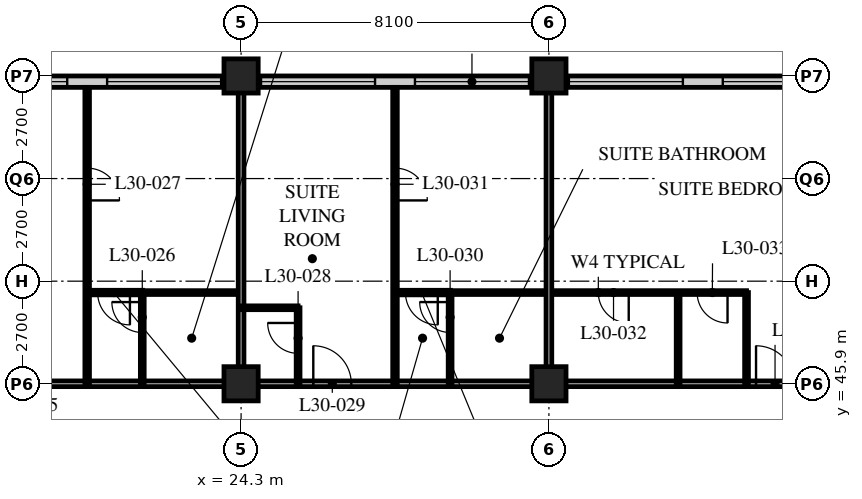
"""IFC4 building model, lengths in metres.
Left out: names, types, materials, properties, quantities, classifications, styles, units other than length and angle.
Written with IfcOpenShell. Run it as: python <this file> out.ifc"""

import sys

from ifc_helpers import new_model, si_unit, direction, frame, frame_2d, origin, origin_2d, place, context, subcontext, project, spatial, rectangle, hollow_rectangle, extrude, element, fill, save


model = new_model("IFC4")
c1 = context("Model", 3, precision=1e-05, world=origin(), true_north=direction((0.0, 1.0)))
c2 = subcontext(c1, "Body", "Model", "MODEL_VIEW")
j1 = project(units=[si_unit("LENGTHUNIT", "METRE"), si_unit("PLANEANGLEUNIT", "RADIAN")], contexts=[c1])
p1 = place(None, origin())
s1 = spatial("IfcSite", under=j1, at=p1, CompositionType="ELEMENT")
p2 = place(p1, origin())
s2 = spatial("IfcBuilding", under=s1, at=p2, CompositionType="ELEMENT")
p3 = place(p2, frame((0.0, 0.0, 120.4)))
s3 = spatial("IfcBuildingStorey", under=s2, at=p3, CompositionType="ELEMENT", Elevation=120.4)
for number, where, z_axis, x_axis in (
    (1, (24.3, 45.9, 0.0), (0.0, 0.0, 1.0), (1.0, 0.0, 0.0)),
    (2, (24.3, 54.0, 0.0), (0.0, 0.0, 1.0), (1.0, 0.0, 0.0)),
    (3, (32.4, 45.9, 0.0), (0.0, 0.0, 1.0), (1.0, 0.0, 0.0)),
    (4, (32.4, 54.0, 0.0), (0.0, 0.0, 1.0), (1.0, 0.0, 0.0)),
):
    element("IfcColumn", number, at=place(p3, frame(where, z_axis=z_axis, x_axis=x_axis)), inside=s3, PredefinedType="COLUMN", context=c2, shape_type="SweptSolid", body=[
        extrude(hollow_rectangle(XDim=0.9, YDim=0.9, WallThickness=0.09, at=origin_2d()), origin(), (0.0, 0.0, 1.0), 3.4),
    ])
p4 = place(p3, frame((48.3, 53.85, 0.0), z_axis=(0.0, 0.0, 1.0), x_axis=(-1.0, 0.0, 0.0)))
e5 = element("IfcWall", 5, at=p4, inside=s3, PredefinedType="SOLIDWALL", context=c2, shape_type="SweptSolid", body=[
    extrude(rectangle(XDim=40.2, YDim=0.3, at=frame_2d((20.1, 0.0))), origin(), (0.0, 0.0, 1.0), 3.19),
])
p5 = place(p4, frame((0.225, 0.0, 0.9)))
e6 = element("IfcOpeningElement", 6, at=p5, cuts=e5, PredefinedType="OPENING", context=c2, shape_type="SweptSolid", body=[
    extrude(rectangle(XDim=3.0, YDim=2.0, at=frame_2d((1.5, 1.0))), frame((0.0, 0.16, 0.0), z_axis=(0.0, -1.0, 0.0), x_axis=(1.0, 0.0, 0.0)), (0.0, 0.0, 1.0), 0.32),
])
p6 = place(p4, frame((4.275, 0.0, 0.9)))
e7 = element("IfcOpeningElement", 7, at=p6, cuts=e5, PredefinedType="OPENING", context=c2, shape_type="SweptSolid", body=[
    extrude(rectangle(XDim=3.0, YDim=2.0, at=frame_2d((1.5, 1.0))), frame((0.0, 0.16, 0.0), z_axis=(0.0, -1.0, 0.0), x_axis=(1.0, 0.0, 0.0)), (0.0, 0.0, 1.0), 0.32),
])
p7 = place(p4, frame((8.325, 0.0, 0.9)))
e8 = element("IfcOpeningElement", 8, at=p7, cuts=e5, PredefinedType="OPENING", context=c2, shape_type="SweptSolid", body=[
    extrude(rectangle(XDim=3.0, YDim=2.0, at=frame_2d((1.5, 1.0))), frame((0.0, 0.16, 0.0), z_axis=(0.0, -1.0, 0.0), x_axis=(1.0, 0.0, 0.0)), (0.0, 0.0, 1.0), 0.32),
])
p8 = place(p4, frame((12.375, 0.0, 0.9)))
e9 = element("IfcOpeningElement", 9, at=p8, cuts=e5, PredefinedType="OPENING", context=c2, shape_type="SweptSolid", body=[
    extrude(rectangle(XDim=3.0, YDim=2.0, at=frame_2d((1.5, 1.0))), frame((0.0, 0.16, 0.0), z_axis=(0.0, -1.0, 0.0), x_axis=(1.0, 0.0, 0.0)), (0.0, 0.0, 1.0), 0.32),
])
p9 = place(p4, frame((16.425, 0.0, 0.9)))
e10 = element("IfcOpeningElement", 10, at=p9, cuts=e5, PredefinedType="OPENING", context=c2, shape_type="SweptSolid", body=[
    extrude(rectangle(XDim=3.0, YDim=2.0, at=frame_2d((1.5, 1.0))), frame((0.0, 0.16, 0.0), z_axis=(0.0, -1.0, 0.0), x_axis=(1.0, 0.0, 0.0)), (0.0, 0.0, 1.0), 0.32),
])
p10 = place(p4, frame((20.475, 0.0, 0.9)))
e11 = element("IfcOpeningElement", 11, at=p10, cuts=e5, PredefinedType="OPENING", context=c2, shape_type="SweptSolid", body=[
    extrude(rectangle(XDim=3.0, YDim=2.0, at=frame_2d((1.5, 1.0))), frame((0.0, 0.16, 0.0), z_axis=(0.0, -1.0, 0.0), x_axis=(1.0, 0.0, 0.0)), (0.0, 0.0, 1.0), 0.32),
])
p11 = place(p4, frame((24.525, 0.0, 0.9)))
e12 = element("IfcOpeningElement", 12, at=p11, cuts=e5, PredefinedType="OPENING", context=c2, shape_type="SweptSolid", body=[
    extrude(rectangle(XDim=3.0, YDim=2.0, at=frame_2d((1.5, 1.0))), frame((0.0, 0.16, 0.0), z_axis=(0.0, -1.0, 0.0), x_axis=(1.0, 0.0, 0.0)), (0.0, 0.0, 1.0), 0.32),
])
p12 = place(p4, frame((28.575, 0.0, 0.9)))
e13 = element("IfcOpeningElement", 13, at=p12, cuts=e5, PredefinedType="OPENING", context=c2, shape_type="SweptSolid", body=[
    extrude(rectangle(XDim=3.0, YDim=2.0, at=frame_2d((1.5, 1.0))), frame((0.0, 0.16, 0.0), z_axis=(0.0, -1.0, 0.0), x_axis=(1.0, 0.0, 0.0)), (0.0, 0.0, 1.0), 0.32),
])
p13 = place(p4, frame((32.625, 0.0, 0.9)))
e14 = element("IfcOpeningElement", 14, at=p13, cuts=e5, PredefinedType="OPENING", context=c2, shape_type="SweptSolid", body=[
    extrude(rectangle(XDim=3.0, YDim=2.0, at=frame_2d((1.5, 1.0))), frame((0.0, 0.16, 0.0), z_axis=(0.0, -1.0, 0.0), x_axis=(1.0, 0.0, 0.0)), (0.0, 0.0, 1.0), 0.32),
])
p14 = place(p4, frame((36.675, 0.0, 0.9)))
e15 = element("IfcOpeningElement", 15, at=p14, cuts=e5, PredefinedType="OPENING", context=c2, shape_type="SweptSolid", body=[
    extrude(rectangle(XDim=3.0, YDim=2.0, at=frame_2d((1.5, 1.0))), frame((0.0, 0.16, 0.0), z_axis=(0.0, -1.0, 0.0), x_axis=(1.0, 0.0, 0.0)), (0.0, 0.0, 1.0), 0.32),
])
p15 = place(p3, frame((12.15, 45.9, 0.0), z_axis=(0.0, 0.0, 1.0), x_axis=(1.0, 0.0, 0.0)))
e16 = element("IfcWall", 16, at=p15, inside=s3, PredefinedType="PARTITIONING", context=c2, shape_type="SweptSolid", body=[
    extrude(rectangle(XDim=32.4, YDim=0.15, at=frame_2d((16.2, 0.0))), origin(), (0.0, 0.0, 1.0), 2.578),
])
p16 = place(p15, frame((5.95, 0.0, 0.0)))
e17 = element("IfcOpeningElement", 17, at=p16, cuts=e16, PredefinedType="OPENING", context=c2, shape_type="SweptSolid", body=[
    extrude(rectangle(XDim=1.0, YDim=2.1, at=frame_2d((0.5, 1.05))), frame((0.0, 0.085, 0.0), z_axis=(0.0, -1.0, 0.0), x_axis=(1.0, 0.0, 0.0)), (0.0, 0.0, 1.0), 0.17),
])
p17 = place(p15, frame((14.05, 0.0, 0.0)))
e18 = element("IfcOpeningElement", 18, at=p17, cuts=e16, PredefinedType="OPENING", context=c2, shape_type="SweptSolid", body=[
    extrude(rectangle(XDim=1.0, YDim=2.1, at=frame_2d((0.5, 1.05))), frame((0.0, 0.085, 0.0), z_axis=(0.0, -1.0, 0.0), x_axis=(1.0, 0.0, 0.0)), (0.0, 0.0, 1.0), 0.17),
])
p18 = place(p15, frame((25.7, 0.0, 0.0)))
e19 = element("IfcOpeningElement", 19, at=p18, cuts=e16, PredefinedType="OPENING", context=c2, shape_type="SweptSolid", body=[
    extrude(rectangle(XDim=1.0, YDim=2.1, at=frame_2d((0.5, 1.05))), frame((0.0, 0.085, 0.0), z_axis=(0.0, -1.0, 0.0), x_axis=(1.0, 0.0, 0.0)), (0.0, 0.0, 1.0), 0.17),
])
p19 = place(p15, frame((29.875, 0.0, 0.0)))
e20 = element("IfcOpeningElement", 20, at=p19, cuts=e16, PredefinedType="OPENING", context=c2, shape_type="SweptSolid", body=[
    extrude(rectangle(XDim=1.0, YDim=2.1, at=frame_2d((0.5, 1.05))), frame((0.0, 0.085, 0.0), z_axis=(0.0, -1.0, 0.0), x_axis=(1.0, 0.0, 0.0)), (0.0, 0.0, 1.0), 0.17),
])
p20 = place(p15, frame((1.525, 0.0, 0.0)))
e21 = element("IfcOpeningElement", 21, at=p20, cuts=e16, PredefinedType="OPENING", context=c2, shape_type="SweptSolid", body=[
    extrude(rectangle(XDim=1.0, YDim=2.1, at=frame_2d((0.5, 1.05))), frame((0.0, 0.085, 0.0), z_axis=(0.0, -1.0, 0.0), x_axis=(1.0, 0.0, 0.0)), (0.0, 0.0, 1.0), 0.17),
])
p21 = place(p3, frame((21.7, 48.3, 0.0), z_axis=(0.0, 0.0, 1.0), x_axis=(1.0, 0.0, 0.0)))
e22 = element("IfcWall", 22, at=p21, inside=s3, PredefinedType="PARTITIONING", context=c2, shape_type="SweptSolid", body=[
    extrude(rectangle(XDim=2.6, YDim=0.1, at=frame_2d((1.3, 0.0))), origin(), (0.0, 0.0, 1.0), 3.19),
])
p22 = place(p3, frame((21.7, 45.9, 0.0), z_axis=(0.0, 0.0, 1.0), x_axis=(0.0, 1.0, 0.0)))
e23 = element("IfcWall", 23, at=p22, inside=s3, PredefinedType="PARTITIONING", context=c2, shape_type="SweptSolid", body=[
    extrude(rectangle(XDim=2.4, YDim=0.1, at=frame_2d((1.2, 0.0))), origin(), (0.0, 0.0, 1.0), 3.19),
])
p23 = place(p22, frame((1.35, 0.0, 0.0)))
e24 = element("IfcOpeningElement", 24, at=p23, cuts=e23, PredefinedType="OPENING", context=c2, shape_type="SweptSolid", body=[
    extrude(rectangle(XDim=0.8, YDim=2.1, at=frame_2d((0.4, 1.05))), frame((0.0, 0.06, 0.0), z_axis=(0.0, -1.0, 0.0), x_axis=(1.0, 0.0, 0.0)), (0.0, 0.0, 1.0), 0.12),
])
p24 = place(p3, frame((20.25, 45.9, 0.0), z_axis=(0.0, 0.0, 1.0), x_axis=(0.0, 1.0, 0.0)))
e25 = element("IfcWall", 25, at=p24, inside=s3, PredefinedType="PARTITIONING", context=c2, shape_type="SweptSolid", body=[
    extrude(rectangle(XDim=7.8, YDim=0.12, at=frame_2d((3.9, 0.0))), origin(), (0.0, 0.0, 1.0), 3.19),
])
p25 = place(p24, frame((4.825, 0.0, 0.0)))
e26 = element("IfcOpeningElement", 26, at=p25, cuts=e25, PredefinedType="OPENING", context=c2, shape_type="SweptSolid", body=[
    extrude(rectangle(XDim=0.85, YDim=2.1, at=frame_2d((0.425, 1.05))), frame((0.0, 0.07, 0.0), z_axis=(0.0, -1.0, 0.0), x_axis=(1.0, 0.0, 0.0)), (0.0, 0.0, 1.0), 0.14),
])
p26 = place(p3, frame((24.3, 45.9, 0.0), z_axis=(0.0, 0.0, 1.0), x_axis=(0.0, 1.0, 0.0)))
e27 = element("IfcWall", 27, at=p26, inside=s3, PredefinedType="PARTITIONING", context=c2, shape_type="SweptSolid", body=[
    extrude(rectangle(XDim=7.8, YDim=0.15, at=frame_2d((3.9, 0.0))), origin(), (0.0, 0.0, 1.0), 2.578),
])
p27 = place(p3, frame((24.3, 47.9, 0.0), z_axis=(0.0, 0.0, 1.0), x_axis=(1.0, 0.0, 0.0)))
e28 = element("IfcWall", 28, at=p27, inside=s3, PredefinedType="PARTITIONING", context=c2, shape_type="SweptSolid", body=[
    extrude(rectangle(XDim=1.5, YDim=0.1, at=frame_2d((0.75, 0.0))), origin(), (0.0, 0.0, 1.0), 3.19),
])
p28 = place(p3, frame((25.8, 45.9, 0.0), z_axis=(0.0, 0.0, 1.0), x_axis=(0.0, 1.0, 0.0)))
e29 = element("IfcWall", 29, at=p28, inside=s3, PredefinedType="PARTITIONING", context=c2, shape_type="SweptSolid", body=[
    extrude(rectangle(XDim=2.0, YDim=0.1, at=frame_2d((1.0, 0.0))), origin(), (0.0, 0.0, 1.0), 3.19),
])
p29 = place(p28, frame((0.8, 0.0, 0.0)))
e30 = element("IfcOpeningElement", 30, at=p29, cuts=e29, PredefinedType="OPENING", context=c2, shape_type="SweptSolid", body=[
    extrude(rectangle(XDim=0.8, YDim=2.1, at=frame_2d((0.4, 1.05))), frame((0.0, 0.06, 0.0), z_axis=(0.0, -1.0, 0.0), x_axis=(1.0, 0.0, 0.0)), (0.0, 0.0, 1.0), 0.12),
])
p30 = place(p3, frame((29.8, 48.3, 0.0), z_axis=(0.0, 0.0, 1.0), x_axis=(1.0, 0.0, 0.0)))
e31 = element("IfcWall", 31, at=p30, inside=s3, PredefinedType="PARTITIONING", context=c2, shape_type="SweptSolid", body=[
    extrude(rectangle(XDim=7.8, YDim=0.1, at=frame_2d((3.9, 0.0))), origin(), (0.0, 0.0, 1.0), 3.19),
])
p31 = place(p30, frame((3.9, 0.0, 0.0)))
e32 = element("IfcOpeningElement", 32, at=p31, cuts=e31, PredefinedType="OPENING", context=c2, shape_type="SweptSolid", body=[
    extrude(rectangle(XDim=0.8, YDim=2.1, at=frame_2d((0.4, 1.05))), frame((0.0, 0.06, 0.0), z_axis=(0.0, -1.0, 0.0), x_axis=(1.0, 0.0, 0.0)), (0.0, 0.0, 1.0), 0.12),
])
p32 = place(p30, frame((6.5, 0.0, 0.0)))
e33 = element("IfcOpeningElement", 33, at=p32, cuts=e31, PredefinedType="OPENING", context=c2, shape_type="SweptSolid", body=[
    extrude(rectangle(XDim=0.8, YDim=2.1, at=frame_2d((0.4, 1.05))), frame((0.0, 0.06, 0.0), z_axis=(0.0, -1.0, 0.0), x_axis=(1.0, 0.0, 0.0)), (0.0, 0.0, 1.0), 0.12),
])
p33 = place(p3, frame((29.8, 45.9, 0.0), z_axis=(0.0, 0.0, 1.0), x_axis=(0.0, 1.0, 0.0)))
e34 = element("IfcWall", 34, at=p33, inside=s3, PredefinedType="PARTITIONING", context=c2, shape_type="SweptSolid", body=[
    extrude(rectangle(XDim=2.4, YDim=0.1, at=frame_2d((1.2, 0.0))), origin(), (0.0, 0.0, 1.0), 3.19),
])
p34 = place(p33, frame((1.35, 0.0, 0.0)))
e35 = element("IfcOpeningElement", 35, at=p34, cuts=e34, PredefinedType="OPENING", context=c2, shape_type="SweptSolid", body=[
    extrude(rectangle(XDim=0.8, YDim=2.1, at=frame_2d((0.4, 1.05))), frame((0.0, 0.06, 0.0), z_axis=(0.0, -1.0, 0.0), x_axis=(1.0, 0.0, 0.0)), (0.0, 0.0, 1.0), 0.12),
])
p35 = place(p3, frame((28.35, 45.9, 0.0), z_axis=(0.0, 0.0, 1.0), x_axis=(0.0, 1.0, 0.0)))
e36 = element("IfcWall", 36, at=p35, inside=s3, PredefinedType="PARTITIONING", context=c2, shape_type="SweptSolid", body=[
    extrude(rectangle(XDim=7.8, YDim=0.12, at=frame_2d((3.9, 0.0))), origin(), (0.0, 0.0, 1.0), 3.19),
])
p36 = place(p35, frame((4.825, 0.0, 0.0)))
e37 = element("IfcOpeningElement", 37, at=p36, cuts=e36, PredefinedType="OPENING", context=c2, shape_type="SweptSolid", body=[
    extrude(rectangle(XDim=0.85, YDim=2.1, at=frame_2d((0.425, 1.05))), frame((0.0, 0.07, 0.0), z_axis=(0.0, -1.0, 0.0), x_axis=(1.0, 0.0, 0.0)), (0.0, 0.0, 1.0), 0.14),
])
p37 = place(p3, frame((32.4, 45.9, 0.0), z_axis=(0.0, 0.0, 1.0), x_axis=(0.0, 1.0, 0.0)))
e38 = element("IfcWall", 38, at=p37, inside=s3, PredefinedType="PARTITIONING", context=c2, shape_type="SweptSolid", body=[
    extrude(rectangle(XDim=7.8, YDim=0.15, at=frame_2d((3.9, 0.0))), origin(), (0.0, 0.0, 1.0), 2.578),
])
for number, where, z_axis, x_axis in (
    (39, (35.8, 45.9, 0.0), (0.0, 0.0, 1.0), (0.0, 1.0, 0.0)),
    (40, (37.6, 45.9, 0.0), (0.0, 0.0, 1.0), (0.0, 1.0, 0.0)),
):
    element("IfcWall", number, at=place(p3, frame(where, z_axis=z_axis, x_axis=x_axis)), inside=s3, PredefinedType="PARTITIONING", context=c2, shape_type="SweptSolid", body=[
        extrude(rectangle(XDim=2.4, YDim=0.1, at=frame_2d((1.2, 0.0))), origin(), (0.0, 0.0, 1.0), 3.19),
    ])
p38 = place(p3, frame((20.25, 48.3, 0.0), z_axis=(0.0, 0.0, 1.0), x_axis=(1.0, 0.0, 0.0)))
e41 = element("IfcWall", 41, at=p38, inside=s3, PredefinedType="PARTITIONING", context=c2, shape_type="SweptSolid", body=[
    extrude(rectangle(XDim=1.46, YDim=0.12, at=frame_2d((0.73, 0.0))), origin(), (0.0, 0.0, 1.0), 3.19),
])
p39 = place(p38, frame((0.275, 0.0, 0.0)))
e42 = element("IfcOpeningElement", 42, at=p39, cuts=e41, PredefinedType="OPENING", context=c2, shape_type="SweptSolid", body=[
    extrude(rectangle(XDim=0.85, YDim=2.1, at=frame_2d((0.425, 1.05))), frame((0.0, 0.07, 0.0), z_axis=(0.0, -1.0, 0.0), x_axis=(1.0, 0.0, 0.0)), (0.0, 0.0, 1.0), 0.14),
])
p40 = place(p3, frame((28.35, 48.3, 0.0), z_axis=(0.0, 0.0, 1.0), x_axis=(1.0, 0.0, 0.0)))
e43 = element("IfcWall", 43, at=p40, inside=s3, PredefinedType="PARTITIONING", context=c2, shape_type="SweptSolid", body=[
    extrude(rectangle(XDim=1.46, YDim=0.12, at=frame_2d((0.73, 0.0))), origin(), (0.0, 0.0, 1.0), 3.19),
])
p41 = place(p40, frame((0.275, 0.0, 0.0)))
e44 = element("IfcOpeningElement", 44, at=p41, cuts=e43, PredefinedType="OPENING", context=c2, shape_type="SweptSolid", body=[
    extrude(rectangle(XDim=0.85, YDim=2.1, at=frame_2d((0.425, 1.05))), frame((0.0, 0.07, 0.0), z_axis=(0.0, -1.0, 0.0), x_axis=(1.0, 0.0, 0.0)), (0.0, 0.0, 1.0), 0.14),
])
p42 = place(p7, origin())
e45 = element("IfcWindow", 45, at=p42, inside=s3, PartitioningType="SINGLE_PANEL", PredefinedType="WINDOW", context=c2, shape_type="SweptSolid", body=[
    extrude(rectangle(XDim=3.0, YDim=2.0, at=frame_2d((1.5, 1.0))), frame((0.0, 0.03, 0.0), z_axis=(0.0, -1.0, 0.0), x_axis=(1.0, 0.0, 0.0)), (0.0, 0.0, 1.0), 0.06),
])
fill(e8, e45)
p43 = place(p8, origin())
e46 = element("IfcWindow", 46, at=p43, inside=s3, PartitioningType="SINGLE_PANEL", PredefinedType="WINDOW", context=c2, shape_type="SweptSolid", body=[
    extrude(rectangle(XDim=3.0, YDim=2.0, at=frame_2d((1.5, 1.0))), frame((0.0, 0.03, 0.0), z_axis=(0.0, -1.0, 0.0), x_axis=(1.0, 0.0, 0.0)), (0.0, 0.0, 1.0), 0.06),
])
fill(e9, e46)
p44 = place(p9, origin())
e47 = element("IfcWindow", 47, at=p44, inside=s3, PartitioningType="SINGLE_PANEL", PredefinedType="WINDOW", context=c2, shape_type="SweptSolid", body=[
    extrude(rectangle(XDim=3.0, YDim=2.0, at=frame_2d((1.5, 1.0))), frame((0.0, 0.03, 0.0), z_axis=(0.0, -1.0, 0.0), x_axis=(1.0, 0.0, 0.0)), (0.0, 0.0, 1.0), 0.06),
])
fill(e10, e47)
p45 = place(p10, origin())
e48 = element("IfcWindow", 48, at=p45, inside=s3, PartitioningType="SINGLE_PANEL", PredefinedType="WINDOW", context=c2, shape_type="SweptSolid", body=[
    extrude(rectangle(XDim=3.0, YDim=2.0, at=frame_2d((1.5, 1.0))), frame((0.0, 0.03, 0.0), z_axis=(0.0, -1.0, 0.0), x_axis=(1.0, 0.0, 0.0)), (0.0, 0.0, 1.0), 0.06),
])
fill(e11, e48)
p46 = place(p11, origin())
e49 = element("IfcWindow", 49, at=p46, inside=s3, PartitioningType="SINGLE_PANEL", PredefinedType="WINDOW", context=c2, shape_type="SweptSolid", body=[
    extrude(rectangle(XDim=3.0, YDim=2.0, at=frame_2d((1.5, 1.0))), frame((0.0, 0.03, 0.0), z_axis=(0.0, -1.0, 0.0), x_axis=(1.0, 0.0, 0.0)), (0.0, 0.0, 1.0), 0.06),
])
fill(e12, e49)
p47 = place(p12, origin())
e50 = element("IfcWindow", 50, at=p47, inside=s3, PartitioningType="SINGLE_PANEL", PredefinedType="WINDOW", context=c2, shape_type="SweptSolid", body=[
    extrude(rectangle(XDim=3.0, YDim=2.0, at=frame_2d((1.5, 1.0))), frame((0.0, 0.03, 0.0), z_axis=(0.0, -1.0, 0.0), x_axis=(1.0, 0.0, 0.0)), (0.0, 0.0, 1.0), 0.06),
])
fill(e13, e50)
p48 = place(p23, origin())
e51 = element("IfcDoor", 51, at=p48, inside=s3, OperationType="SINGLE_SWING_RIGHT", PredefinedType="DOOR", context=c2, shape_type="SweptSolid", body=[
    extrude(rectangle(XDim=0.8, YDim=2.1, at=frame_2d((0.4, 1.05))), frame((0.0, 0.025, 0.0), z_axis=(0.0, -1.0, 0.0), x_axis=(1.0, 0.0, 0.0)), (0.0, 0.0, 1.0), 0.05),
])
fill(e24, e51)
p49 = place(p25, origin())
e52 = element("IfcDoor", 52, at=p49, inside=s3, OperationType="SINGLE_SWING_RIGHT", PredefinedType="DOOR", context=c2, shape_type="SweptSolid", body=[
    extrude(rectangle(XDim=0.85, YDim=2.1, at=frame_2d((0.425, 1.05))), frame((0.0, 0.025, 0.0), z_axis=(0.0, -1.0, 0.0), x_axis=(1.0, 0.0, 0.0)), (0.0, 0.0, 1.0), 0.05),
])
fill(e26, e52)
p50 = place(p29, origin())
e53 = element("IfcDoor", 53, at=p50, inside=s3, OperationType="SINGLE_SWING_RIGHT", PredefinedType="DOOR", context=c2, shape_type="SweptSolid", body=[
    extrude(rectangle(XDim=0.8, YDim=2.1, at=frame_2d((0.4, 1.05))), frame((0.0, 0.025, 0.0), z_axis=(0.0, -1.0, 0.0), x_axis=(1.0, 0.0, 0.0)), (0.0, 0.0, 1.0), 0.05),
])
fill(e30, e53)
p51 = place(p17, origin())
e54 = element("IfcDoor", 54, at=p51, inside=s3, OperationType="SINGLE_SWING_LEFT", PredefinedType="DOOR", context=c2, shape_type="SweptSolid", body=[
    extrude(rectangle(XDim=1.0, YDim=2.1, at=frame_2d((0.5, 1.05))), frame((0.0, 0.025, 0.0), z_axis=(0.0, -1.0, 0.0), x_axis=(1.0, 0.0, 0.0)), (0.0, 0.0, 1.0), 0.05),
])
fill(e18, e54)
p52 = place(p34, origin())
e55 = element("IfcDoor", 55, at=p52, inside=s3, OperationType="SINGLE_SWING_RIGHT", PredefinedType="DOOR", context=c2, shape_type="SweptSolid", body=[
    extrude(rectangle(XDim=0.8, YDim=2.1, at=frame_2d((0.4, 1.05))), frame((0.0, 0.025, 0.0), z_axis=(0.0, -1.0, 0.0), x_axis=(1.0, 0.0, 0.0)), (0.0, 0.0, 1.0), 0.05),
])
fill(e35, e55)
p53 = place(p36, origin())
e56 = element("IfcDoor", 56, at=p53, inside=s3, OperationType="SINGLE_SWING_RIGHT", PredefinedType="DOOR", context=c2, shape_type="SweptSolid", body=[
    extrude(rectangle(XDim=0.85, YDim=2.1, at=frame_2d((0.425, 1.05))), frame((0.0, 0.025, 0.0), z_axis=(0.0, -1.0, 0.0), x_axis=(1.0, 0.0, 0.0)), (0.0, 0.0, 1.0), 0.05),
])
fill(e37, e56)
p54 = place(p31, origin())
e57 = element("IfcDoor", 57, at=p54, inside=s3, OperationType="SINGLE_SWING_LEFT", PredefinedType="DOOR", context=c2, shape_type="SweptSolid", body=[
    extrude(rectangle(XDim=0.8, YDim=2.1, at=frame_2d((0.4, 1.05))), frame((0.0, 0.025, 0.0), z_axis=(0.0, -1.0, 0.0), x_axis=(1.0, 0.0, 0.0)), (0.0, 0.0, 1.0), 0.05),
])
fill(e32, e57)
p55 = place(p32, origin())
e58 = element("IfcDoor", 58, at=p55, inside=s3, OperationType="SINGLE_SWING_LEFT", PredefinedType="DOOR", context=c2, shape_type="SweptSolid", body=[
    extrude(rectangle(XDim=0.8, YDim=2.1, at=frame_2d((0.4, 1.05))), frame((0.0, 0.025, 0.0), z_axis=(0.0, -1.0, 0.0), x_axis=(1.0, 0.0, 0.0)), (0.0, 0.0, 1.0), 0.05),
])
fill(e33, e58)
p56 = place(p18, origin())
e59 = element("IfcDoor", 59, at=p56, inside=s3, OperationType="SINGLE_SWING_LEFT", PredefinedType="DOOR", context=c2, shape_type="SweptSolid", body=[
    extrude(rectangle(XDim=1.0, YDim=2.1, at=frame_2d((0.5, 1.05))), frame((0.0, 0.025, 0.0), z_axis=(0.0, -1.0, 0.0), x_axis=(1.0, 0.0, 0.0)), (0.0, 0.0, 1.0), 0.05),
])
fill(e19, e59)
p57 = place(p39, origin())
e60 = element("IfcDoor", 60, at=p57, inside=s3, OperationType="SINGLE_SWING_LEFT", PredefinedType="DOOR", context=c2, shape_type="SweptSolid", body=[
    extrude(rectangle(XDim=0.85, YDim=2.1, at=frame_2d((0.425, 1.05))), frame((0.0, 0.025, 0.0), z_axis=(0.0, -1.0, 0.0), x_axis=(1.0, 0.0, 0.0)), (0.0, 0.0, 1.0), 0.05),
])
fill(e42, e60)
p58 = place(p41, origin())
e61 = element("IfcDoor", 61, at=p58, inside=s3, OperationType="SINGLE_SWING_LEFT", PredefinedType="DOOR", context=c2, shape_type="SweptSolid", body=[
    extrude(rectangle(XDim=0.85, YDim=2.1, at=frame_2d((0.425, 1.05))), frame((0.0, 0.025, 0.0), z_axis=(0.0, -1.0, 0.0), x_axis=(1.0, 0.0, 0.0)), (0.0, 0.0, 1.0), 0.05),
])
fill(e44, e61)
save(model, sys.argv[1])
